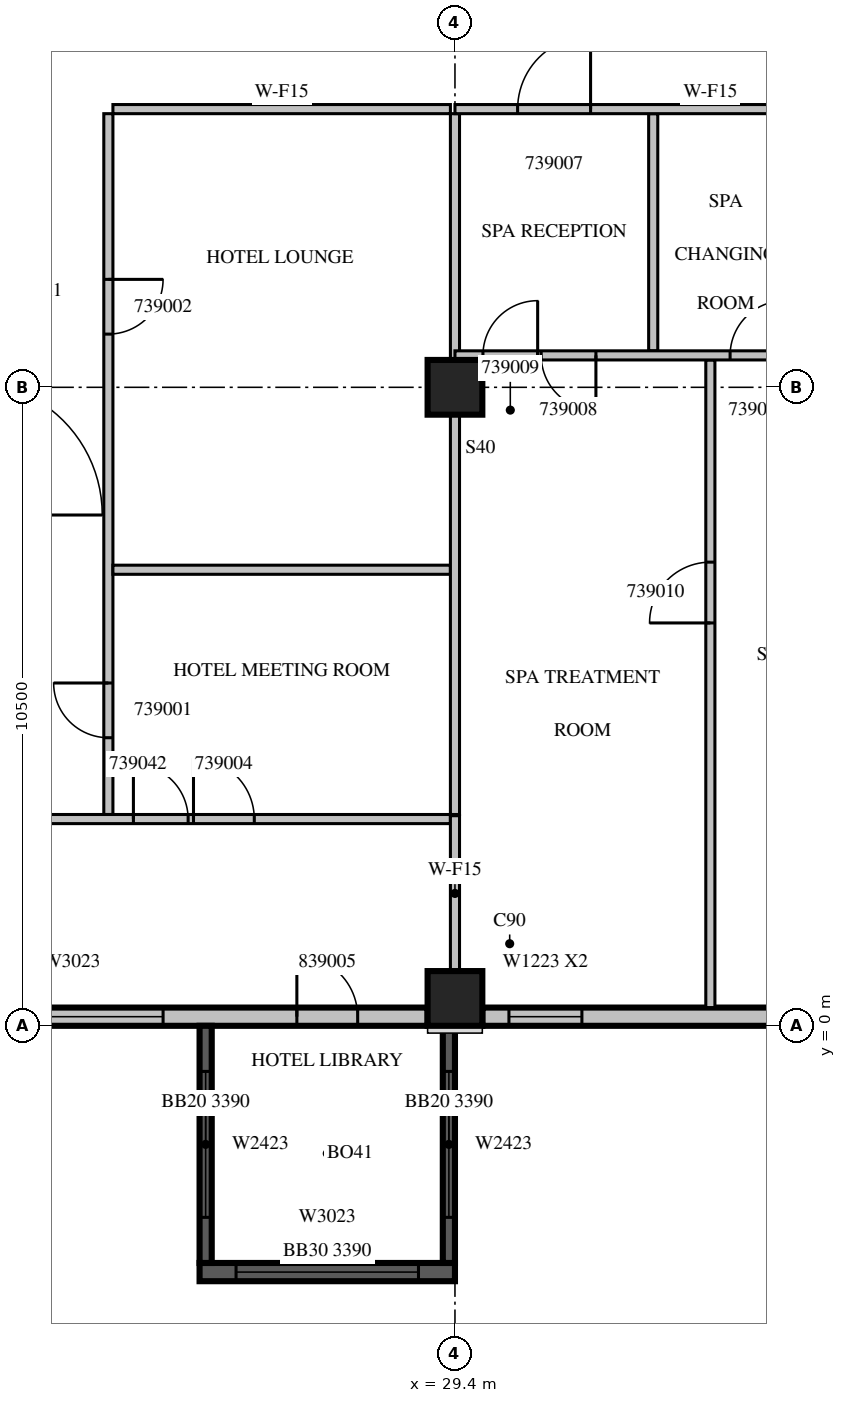
"""IFC4 building model, lengths in metres.
Left out: names, types, materials, properties, quantities, classifications, styles, units other than length and angle.
Written with IfcOpenShell. Run it as: python <this file> out.ifc"""

import sys

from ifc_helpers import new_model, si_unit, direction, frame, frame_2d, origin, origin_2d, place, context, subcontext, project, spatial, rectangle, extrude, source, transform, mapped, element, fill, save


model = new_model("IFC4")
c1 = context("Model", 3, precision=1e-05, world=origin(), true_north=direction((0.0, 1.0)))
c2 = subcontext(c1, "Body", "Model", "MODEL_VIEW")
j1 = project(units=[si_unit("LENGTHUNIT", "METRE"), si_unit("PLANEANGLEUNIT", "RADIAN")], contexts=[c1])
p1 = place(None, origin())
s1 = spatial("IfcSite", under=j1, at=p1, CompositionType="ELEMENT")
p2 = place(p1, origin())
s2 = spatial("IfcBuilding", under=s1, at=p2, CompositionType="ELEMENT")
p3 = place(p2, frame((0.0, 0.0, 181.6)))
s3 = spatial("IfcBuildingStorey", under=s2, at=p3, CompositionType="ELEMENT", Elevation=181.6)
m1 = source(origin(), c2, "Body", "SweptSolid", [
    extrude(rectangle(XDim=0.9, YDim=0.9, at=origin_2d()), origin(), (0.0, 0.0, 1.0), 3.8),
])
for number, where, z_axis, x_axis in (
    (1, (29.4, 0.45, 0.0), (0.0, 0.0, 1.0), (1.0, 0.0, 0.0)),
    (2, (29.4, 10.5, 0.0), (0.0, 0.0, 1.0), (1.0, 0.0, 0.0)),
):
    element("IfcColumn", number, at=place(p3, frame(where, z_axis=z_axis, x_axis=x_axis)), inside=s3, PredefinedType="COLUMN", context=c2, shape_type="MappedRepresentation", body=[
        mapped(m1, transform((0.0, 0.0, 0.0), scale=1.0)),
    ])
m2 = source(origin(), c2, "Body", "SweptSolid", [
    extrude(rectangle(XDim=7.5, YDim=0.3, at=frame_2d((3.75, 0.0))), origin(), (0.0, 0.0, 1.0), 3.4),
])
p4 = place(p3, frame((21.45, 0.15, 0.0), z_axis=(0.0, 0.0, 1.0), x_axis=(1.0, 0.0, 0.0)))
e3 = element("IfcWall", 3, at=p4, inside=s3, PredefinedType="STANDARD", context=c2, shape_type="MappedRepresentation", body=[
    mapped(m2, transform((0.0, 0.0, 0.0), scale=1.0)),
])
m3 = source(origin(), c2, "Body", "SweptSolid", [
    extrude(rectangle(XDim=3.0, YDim=2.3, at=frame_2d((1.5, 1.15))), frame((0.0, 0.16, 0.0), z_axis=(0.0, -1.0, 0.0), x_axis=(1.0, 0.0, 0.0)), (0.0, 0.0, 1.0), 0.32),
])
p5 = place(p4, frame((0.15, 0.0, 0.6)))
e4 = element("IfcOpeningElement", 4, at=p5, cuts=e3, PredefinedType="OPENING", context=c2, shape_type="MappedRepresentation", body=[
    mapped(m3, transform((0.0, 0.0, 0.0), scale=1.0)),
])
m4 = source(origin(), c2, "Body", "SweptSolid", [
    extrude(rectangle(XDim=1.0, YDim=2.1, at=frame_2d((0.5, 1.05))), frame((0.0, 0.16, 0.0), z_axis=(0.0, -1.0, 0.0), x_axis=(1.0, 0.0, 0.0)), (0.0, 0.0, 1.0), 0.32),
])
p6 = place(p4, frame((5.35, 0.0, 0.0)))
e5 = element("IfcOpeningElement", 5, at=p6, cuts=e3, PredefinedType="OPENING", context=c2, shape_type="MappedRepresentation", body=[
    mapped(m4, transform((0.0, 0.0, 0.0), scale=1.0)),
])
p7 = place(p3, frame((29.85, 0.15, 0.0), z_axis=(0.0, 0.0, 1.0), x_axis=(1.0, 0.0, 0.0)))
e6 = element("IfcWall", 6, at=p7, inside=s3, PredefinedType="STANDARD", context=c2, shape_type="MappedRepresentation", body=[
    mapped(m2, transform((0.0, 0.0, 0.0), scale=1.0)),
])
m5 = source(origin(), c2, "Body", "SweptSolid", [
    extrude(rectangle(XDim=1.2, YDim=2.3, at=frame_2d((0.6, 1.15))), frame((0.0, 0.16, 0.0), z_axis=(0.0, -1.0, 0.0), x_axis=(1.0, 0.0, 0.0)), (0.0, 0.0, 1.0), 0.32),
])
p8 = place(p7, frame((0.438, 0.0, 0.6)))
e7 = element("IfcOpeningElement", 7, at=p8, cuts=e6, PredefinedType="OPENING", context=c2, shape_type="MappedRepresentation", body=[
    mapped(m5, transform((0.0, 0.0, 0.0), scale=1.0)),
])
p9 = place(p7, frame((5.963, 0.0, 0.6)))
e8 = element("IfcOpeningElement", 8, at=p9, cuts=e6, PredefinedType="OPENING", context=c2, shape_type="MappedRepresentation", body=[
    mapped(m5, transform((0.0, 0.0, 0.0), scale=1.0)),
])
m6 = source(origin(), c2, "Body", "SweptSolid", [
    extrude(rectangle(XDim=4.2, YDim=0.3, at=frame_2d((2.1, 0.0))), origin(), (0.0, 0.0, 1.0), 3.39),
])
p10 = place(p3, frame((25.2, -4.05, 0.0), z_axis=(0.0, 0.0, 1.0), x_axis=(1.0, 0.0, 0.0)))
e9 = element("IfcWall", 9, at=p10, inside=s3, PredefinedType="SOLIDWALL", context=c2, shape_type="MappedRepresentation", body=[
    mapped(m6, transform((0.0, 0.0, 0.0), scale=1.0)),
])
p11 = place(p10, frame((0.6, 0.0, 0.6)))
e10 = element("IfcOpeningElement", 10, at=p11, cuts=e9, PredefinedType="OPENING", context=c2, shape_type="MappedRepresentation", body=[
    mapped(m3, transform((0.0, 0.0, 0.0), scale=1.0)),
])
m7 = source(origin(), c2, "Body", "SweptSolid", [
    extrude(rectangle(XDim=3.9, YDim=0.2, at=frame_2d((1.95, 0.0))), origin(), (0.0, 0.0, 1.0), 3.39),
])
p12 = place(p3, frame((25.3, 0.0, 0.0), z_axis=(0.0, 0.0, 1.0), x_axis=(0.0, -1.0, 0.0)))
e11 = element("IfcWall", 11, at=p12, inside=s3, PredefinedType="SOLIDWALL", context=c2, shape_type="MappedRepresentation", body=[
    mapped(m7, transform((0.0, 0.0, 0.0), scale=1.0)),
])
m8 = source(origin(), c2, "Body", "SweptSolid", [
    extrude(rectangle(XDim=2.4, YDim=2.3, at=frame_2d((1.2, 1.15))), frame((0.0, 0.11, 0.0), z_axis=(0.0, -1.0, 0.0), x_axis=(1.0, 0.0, 0.0)), (0.0, 0.0, 1.0), 0.22),
])
p13 = place(p12, frame((0.75, 0.0, 0.6)))
e12 = element("IfcOpeningElement", 12, at=p13, cuts=e11, PredefinedType="OPENING", context=c2, shape_type="MappedRepresentation", body=[
    mapped(m8, transform((0.0, 0.0, 0.0), scale=1.0)),
])
p14 = place(p3, frame((29.3, 0.0, 0.0), z_axis=(0.0, 0.0, 1.0), x_axis=(0.0, -1.0, 0.0)))
e13 = element("IfcWall", 13, at=p14, inside=s3, PredefinedType="SOLIDWALL", context=c2, shape_type="MappedRepresentation", body=[
    mapped(m7, transform((0.0, 0.0, 0.0), scale=1.0)),
])
p15 = place(p14, frame((0.75, 0.0, 0.6)))
e14 = element("IfcOpeningElement", 14, at=p15, cuts=e13, PredefinedType="OPENING", context=c2, shape_type="MappedRepresentation", body=[
    mapped(m8, transform((0.0, 0.0, 0.0), scale=1.0)),
])
p16 = place(p3, frame((23.7, 15.0, 0.0), z_axis=(0.0, 0.0, 1.0), x_axis=(0.0, -1.0, 0.0)))
e15 = element("IfcWall", 15, at=p16, inside=s3, PredefinedType="PARTITIONING", context=c2, shape_type="SweptSolid", body=[
    extrude(rectangle(XDim=11.525, YDim=0.15, at=frame_2d((5.763, 0.0))), origin(), (0.0, 0.0, 1.0), 3.4),
])
m9 = source(origin(), c2, "Body", "SweptSolid", [
    extrude(rectangle(XDim=0.9, YDim=2.1, at=frame_2d((0.45, 1.05))), frame((0.0, 0.085, 0.0), z_axis=(0.0, -1.0, 0.0), x_axis=(1.0, 0.0, 0.0)), (0.0, 0.0, 1.0), 0.17),
])
p17 = place(p16, frame((9.363, 0.0, 0.0)))
e16 = element("IfcOpeningElement", 16, at=p17, cuts=e15, PredefinedType="OPENING", context=c2, shape_type="MappedRepresentation", body=[
    mapped(m9, transform((0.0, 0.0, 0.0), scale=1.0)),
])
p18 = place(p16, frame((2.725, 0.0, 0.0)))
e17 = element("IfcOpeningElement", 17, at=p18, cuts=e15, PredefinedType="OPENING", context=c2, shape_type="MappedRepresentation", body=[
    mapped(m9, transform((0.0, 0.0, 0.0), scale=1.0)),
])
m10 = source(origin(), c2, "Body", "SweptSolid", [
    extrude(rectangle(XDim=5.55, YDim=0.15, at=frame_2d((2.775, 0.0))), origin(), (0.0, 0.0, 1.0), 3.4),
])
for number, where, z_axis, x_axis in (
    (18, (29.325, 7.5, 0.0), (0.0, 0.0, 1.0), (-1.0, 0.0, 0.0)),
    (19, (29.325, 15.075, 0.0), (0.0, 0.0, 1.0), (-1.0, 0.0, 0.0)),
):
    element("IfcWall", number, at=place(p3, frame(where, z_axis=z_axis, x_axis=x_axis)), inside=s3, PredefinedType="PARTITIONING", context=c2, shape_type="MappedRepresentation", body=[
        mapped(m10, transform((0.0, 0.0, 0.0), scale=1.0)),
    ])
m11 = source(origin(), c2, "Body", "SweptSolid", [
    extrude(rectangle(XDim=6.576, YDim=0.15, at=frame_2d((3.288, 0.0))), origin(), (0.0, 0.0, 1.0), 3.4),
])
p19 = place(p3, frame((29.4, 3.475, 0.0), z_axis=(0.0, 0.0, 1.0), x_axis=(0.0, 1.0, 0.0)))
e20 = element("IfcWall", 20, at=p19, inside=s3, PredefinedType="PARTITIONING", context=c2, shape_type="MappedRepresentation", body=[
    mapped(m11, transform((0.0, 0.0, 0.0), scale=1.0)),
])
m12 = source(origin(), c2, "Body", "SweptSolid", [
    extrude(rectangle(XDim=4.051, YDim=0.15, at=frame_2d((2.026, 0.0))), origin(), (0.0, 0.0, 1.0), 3.4),
])
p20 = place(p3, frame((29.4, 10.949, 0.0), z_axis=(0.0, 0.0, 1.0), x_axis=(0.0, 1.0, 0.0)))
e21 = element("IfcWall", 21, at=p20, inside=s3, PredefinedType="PARTITIONING", context=c2, shape_type="MappedRepresentation", body=[
    mapped(m12, transform((0.0, 0.0, 0.0), scale=1.0)),
])
p21 = place(p3, frame((21.8, 3.4, 0.0), z_axis=(0.0, 0.0, 1.0), x_axis=(1.0, 0.0, 0.0)))
e22 = element("IfcWall", 22, at=p21, inside=s3, PredefinedType="PARTITIONING", context=c2, shape_type="SweptSolid", body=[
    extrude(rectangle(XDim=7.525, YDim=0.15, at=frame_2d((3.763, 0.0))), origin(), (0.0, 0.0, 1.0), 3.4),
])
m13 = source(origin(), c2, "Body", "SweptSolid", [
    extrude(rectangle(XDim=1.0, YDim=2.1, at=frame_2d((0.5, 1.05))), frame((0.0, 0.085, 0.0), z_axis=(0.0, -1.0, 0.0), x_axis=(1.0, 0.0, 0.0)), (0.0, 0.0, 1.0), 0.17),
])
p22 = place(p21, frame((3.3, 0.0, 0.0)))
e23 = element("IfcOpeningElement", 23, at=p22, cuts=e22, PredefinedType="OPENING", context=c2, shape_type="MappedRepresentation", body=[
    mapped(m13, transform((0.0, 0.0, 0.0), scale=1.0)),
])
p23 = place(p21, frame((2.312, 0.0, 0.0)))
e24 = element("IfcOpeningElement", 24, at=p23, cuts=e22, PredefinedType="OPENING", context=c2, shape_type="MappedRepresentation", body=[
    mapped(m9, transform((0.0, 0.0, 0.0), scale=1.0)),
])
m14 = source(origin(), c2, "Body", "SweptSolid", [
    extrude(rectangle(XDim=10.65, YDim=0.15, at=frame_2d((5.325, 0.0))), origin(), (0.0, 0.0, 1.0), 3.4),
])
p24 = place(p3, frame((33.6, 0.3, 0.0), z_axis=(0.0, 0.0, 1.0), x_axis=(0.0, 1.0, 0.0)))
e25 = element("IfcWall", 25, at=p24, inside=s3, PredefinedType="PARTITIONING", context=c2, shape_type="MappedRepresentation", body=[
    mapped(m14, transform((0.0, 0.0, 0.0), scale=1.0)),
])
p25 = place(p24, frame((6.325, 0.0, 0.0)))
e26 = element("IfcOpeningElement", 26, at=p25, cuts=e25, PredefinedType="OPENING", context=c2, shape_type="MappedRepresentation", body=[
    mapped(m13, transform((0.0, 0.0, 0.0), scale=1.0)),
])
m15 = source(origin(), c2, "Body", "SweptSolid", [
    extrude(rectangle(XDim=3.9, YDim=0.15, at=frame_2d((1.95, 0.0))), origin(), (0.0, 0.0, 1.0), 3.4),
])
p26 = place(p3, frame((32.66, 11.1, 0.0), z_axis=(0.0, 0.0, 1.0), x_axis=(0.0, 1.0, 0.0)))
e27 = element("IfcWall", 27, at=p26, inside=s3, PredefinedType="PARTITIONING", context=c2, shape_type="MappedRepresentation", body=[
    mapped(m15, transform((0.0, 0.0, 0.0), scale=1.0)),
])
m16 = source(origin(), c2, "Body", "SweptSolid", [
    extrude(rectangle(XDim=2.556, YDim=0.15, at=frame_2d((1.278, 0.0))), origin(), (0.0, 0.0, 1.0), 3.4),
])
p27 = place(p3, frame((29.4, 0.899, 0.0), z_axis=(0.0, 0.0, 1.0), x_axis=(0.0, 1.0, 0.0)))
e28 = element("IfcWall", 28, at=p27, inside=s3, PredefinedType="PARTITIONING", context=c2, shape_type="MappedRepresentation", body=[
    mapped(m16, transform((0.0, 0.0, 0.0), scale=1.0)),
])
m17 = source(origin(), c2, "Body", "SweptSolid", [
    extrude(rectangle(XDim=8.4, YDim=0.15, at=frame_2d((4.2, 0.0))), origin(), (0.0, 0.0, 1.0), 3.4),
])
p28 = place(p3, frame((37.8, 11.025, 0.0), z_axis=(0.0, 0.0, 1.0), x_axis=(-1.0, 0.0, 0.0)))
e29 = element("IfcWall", 29, at=p28, inside=s3, PredefinedType="PARTITIONING", context=c2, shape_type="MappedRepresentation", body=[
    mapped(m17, transform((0.0, 0.0, 0.0), scale=1.0)),
])
p29 = place(p28, frame((6.082, 0.0, 0.0)))
e30 = element("IfcOpeningElement", 30, at=p29, cuts=e29, PredefinedType="OPENING", context=c2, shape_type="MappedRepresentation", body=[
    mapped(m9, transform((0.0, 0.0, 0.0), scale=1.0)),
])
p30 = place(p28, frame((7.04, 0.0, 0.0)))
e31 = element("IfcOpeningElement", 31, at=p30, cuts=e29, PredefinedType="OPENING", context=c2, shape_type="MappedRepresentation", body=[
    mapped(m9, transform((0.0, 0.0, 0.0), scale=1.0)),
])
p31 = place(p28, frame((2.975, 0.0, 0.0)))
e32 = element("IfcOpeningElement", 32, at=p31, cuts=e29, PredefinedType="OPENING", context=c2, shape_type="MappedRepresentation", body=[
    mapped(m9, transform((0.0, 0.0, 0.0), scale=1.0)),
])
p32 = place(p28, frame((1.113, 0.0, 0.0)))
e33 = element("IfcOpeningElement", 33, at=p32, cuts=e29, PredefinedType="OPENING", context=c2, shape_type="MappedRepresentation", body=[
    mapped(m9, transform((0.0, 0.0, 0.0), scale=1.0)),
])
p33 = place(p3, frame((37.8, 15.075, 0.0), z_axis=(0.0, 0.0, 1.0), x_axis=(-1.0, 0.0, 0.0)))
e34 = element("IfcWall", 34, at=p33, inside=s3, PredefinedType="PARTITIONING", context=c2, shape_type="MappedRepresentation", body=[
    mapped(m17, transform((0.0, 0.0, 0.0), scale=1.0)),
])
m18 = source(origin(), c2, "Body", "SweptSolid", [
    extrude(rectangle(XDim=1.2, YDim=2.1, at=frame_2d((0.6, 1.05))), frame((0.0, 0.085, 0.0), z_axis=(0.0, -1.0, 0.0), x_axis=(1.0, 0.0, 0.0)), (0.0, 0.0, 1.0), 0.17),
])
p34 = place(p33, frame((6.17, 0.0, 0.0)))
e35 = element("IfcOpeningElement", 35, at=p34, cuts=e34, PredefinedType="OPENING", context=c2, shape_type="MappedRepresentation", body=[
    mapped(m18, transform((0.0, 0.0, 0.0), scale=1.0)),
])
m19 = source(origin(), c2, "Body", "SweptSolid", [
    extrude(rectangle(XDim=3.0, YDim=2.3, at=frame_2d((1.5, 1.15))), frame((0.0, 0.03, 0.0), z_axis=(0.0, -1.0, 0.0), x_axis=(1.0, 0.0, 0.0)), (0.0, 0.0, 1.0), 0.06),
])
p35 = place(p5, origin())
e36 = element("IfcWindow", 36, at=p35, inside=s3, PartitioningType="SINGLE_PANEL", PredefinedType="WINDOW", context=c2, shape_type="MappedRepresentation", body=[
    mapped(m19, transform((0.0, 0.0, 0.0), scale=1.0)),
])
fill(e4, e36)
m20 = source(origin(), c2, "Body", "SweptSolid", [
    extrude(rectangle(XDim=1.2, YDim=2.3, at=frame_2d((0.6, 1.15))), frame((0.0, 0.03, 0.0), z_axis=(0.0, -1.0, 0.0), x_axis=(1.0, 0.0, 0.0)), (0.0, 0.0, 1.0), 0.06),
])
p36 = place(p8, origin())
e37 = element("IfcWindow", 37, at=p36, inside=s3, PartitioningType="SINGLE_PANEL", PredefinedType="WINDOW", context=c2, shape_type="MappedRepresentation", body=[
    mapped(m20, transform((0.0, 0.0, 0.0), scale=1.0)),
])
fill(e7, e37)
p37 = place(p11, origin())
e38 = element("IfcWindow", 38, at=p37, inside=s3, PartitioningType="SINGLE_PANEL", PredefinedType="WINDOW", context=c2, shape_type="MappedRepresentation", body=[
    mapped(m19, transform((0.0, 0.0, 0.0), scale=1.0)),
])
fill(e10, e38)
m21 = source(origin(), c2, "Body", "SweptSolid", [
    extrude(rectangle(XDim=2.4, YDim=2.3, at=frame_2d((1.2, 1.15))), frame((0.0, 0.03, 0.0), z_axis=(0.0, -1.0, 0.0), x_axis=(1.0, 0.0, 0.0)), (0.0, 0.0, 1.0), 0.06),
])
p38 = place(p13, origin())
e39 = element("IfcWindow", 39, at=p38, inside=s3, PartitioningType="SINGLE_PANEL", PredefinedType="WINDOW", context=c2, shape_type="MappedRepresentation", body=[
    mapped(m21, transform((0.0, 0.0, 0.0), scale=1.0)),
])
fill(e12, e39)
p39 = place(p15, origin())
e40 = element("IfcWindow", 40, at=p39, inside=s3, PartitioningType="SINGLE_PANEL", PredefinedType="WINDOW", context=c2, shape_type="MappedRepresentation", body=[
    mapped(m21, transform((0.0, 0.0, 0.0), scale=1.0)),
])
fill(e14, e40)
m22 = source(origin(), c2, "Body", "SweptSolid", [
    extrude(rectangle(XDim=0.9, YDim=2.1, at=frame_2d((0.45, 1.05))), frame((0.0, 0.025, 0.0), z_axis=(0.0, -1.0, 0.0), x_axis=(1.0, 0.0, 0.0)), (0.0, 0.0, 1.0), 0.05),
])
p40 = place(p17, origin())
e41 = element("IfcDoor", 41, at=p40, inside=s3, OperationType="SINGLE_SWING_RIGHT", PredefinedType="DOOR", context=c2, shape_type="MappedRepresentation", body=[
    mapped(m22, transform((0.0, 0.0, 0.0), scale=1.0)),
])
fill(e16, e41)
p41 = place(p18, origin())
e42 = element("IfcDoor", 42, at=p41, inside=s3, OperationType="SINGLE_SWING_LEFT", PredefinedType="DOOR", context=c2, shape_type="MappedRepresentation", body=[
    mapped(m22, transform((0.0, 0.0, 0.0), scale=1.0)),
])
fill(e17, e42)
m23 = source(origin(), c2, "Body", "SweptSolid", [
    extrude(rectangle(XDim=1.0, YDim=2.1, at=frame_2d((0.5, 1.05))), frame((0.0, 0.025, 0.0), z_axis=(0.0, -1.0, 0.0), x_axis=(1.0, 0.0, 0.0)), (0.0, 0.0, 1.0), 0.05),
])
p42 = place(p22, origin())
e43 = element("IfcDoor", 43, at=p42, inside=s3, OperationType="SINGLE_SWING_LEFT", PredefinedType="DOOR", context=c2, shape_type="MappedRepresentation", body=[
    mapped(m23, transform((0.0, 0.0, 0.0), scale=1.0)),
])
fill(e23, e43)
m24 = source(origin(), c2, "Body", "SweptSolid", [
    extrude(rectangle(XDim=1.2, YDim=2.1, at=frame_2d((0.6, 1.05))), frame((0.0, 0.025, 0.0), z_axis=(0.0, -1.0, 0.0), x_axis=(1.0, 0.0, 0.0)), (0.0, 0.0, 1.0), 0.05),
])
p43 = place(p34, origin())
e44 = element("IfcDoor", 44, at=p43, inside=s3, OperationType="SINGLE_SWING_RIGHT", PredefinedType="DOOR", context=c2, shape_type="MappedRepresentation", body=[
    mapped(m24, transform((0.0, 0.0, 0.0), scale=1.0)),
])
fill(e35, e44)
p44 = place(p29, origin())
e45 = element("IfcDoor", 45, at=p44, inside=s3, OperationType="SINGLE_SWING_LEFT", PredefinedType="DOOR", context=c2, shape_type="MappedRepresentation", body=[
    mapped(m22, transform((0.0, 0.0, 0.0), scale=1.0)),
])
fill(e30, e45)
p45 = place(p30, origin())
e46 = element("IfcDoor", 46, at=p45, inside=s3, OperationType="SINGLE_SWING_RIGHT", PredefinedType="DOOR", context=c2, shape_type="MappedRepresentation", body=[
    mapped(m22, transform((0.0, 0.0, 0.0), scale=1.0)),
])
fill(e31, e46)
p46 = place(p25, origin())
e47 = element("IfcDoor", 47, at=p46, inside=s3, OperationType="SINGLE_SWING_LEFT", PredefinedType="DOOR", context=c2, shape_type="MappedRepresentation", body=[
    mapped(m23, transform((0.0, 0.0, 0.0), scale=1.0)),
])
fill(e26, e47)
p47 = place(p31, origin())
e48 = element("IfcDoor", 48, at=p47, inside=s3, OperationType="SINGLE_SWING_RIGHT", PredefinedType="DOOR", context=c2, shape_type="MappedRepresentation", body=[
    mapped(m22, transform((0.0, 0.0, 0.0), scale=1.0)),
])
fill(e32, e48)
p48 = place(p23, origin())
e49 = element("IfcDoor", 49, at=p48, inside=s3, OperationType="SINGLE_SWING_LEFT", PredefinedType="DOOR", context=c2, shape_type="MappedRepresentation", body=[
    mapped(m22, transform((0.0, 0.0, 0.0), scale=1.0)),
])
fill(e24, e49)
p49 = place(p6, origin())
e50 = element("IfcDoor", 50, at=p49, inside=s3, OperationType="SINGLE_SWING_LEFT", PredefinedType="DOOR", context=c2, shape_type="MappedRepresentation", body=[
    mapped(m23, transform((0.0, 0.0, 0.0), scale=1.0)),
])
fill(e5, e50)
save(model, sys.argv[1])
